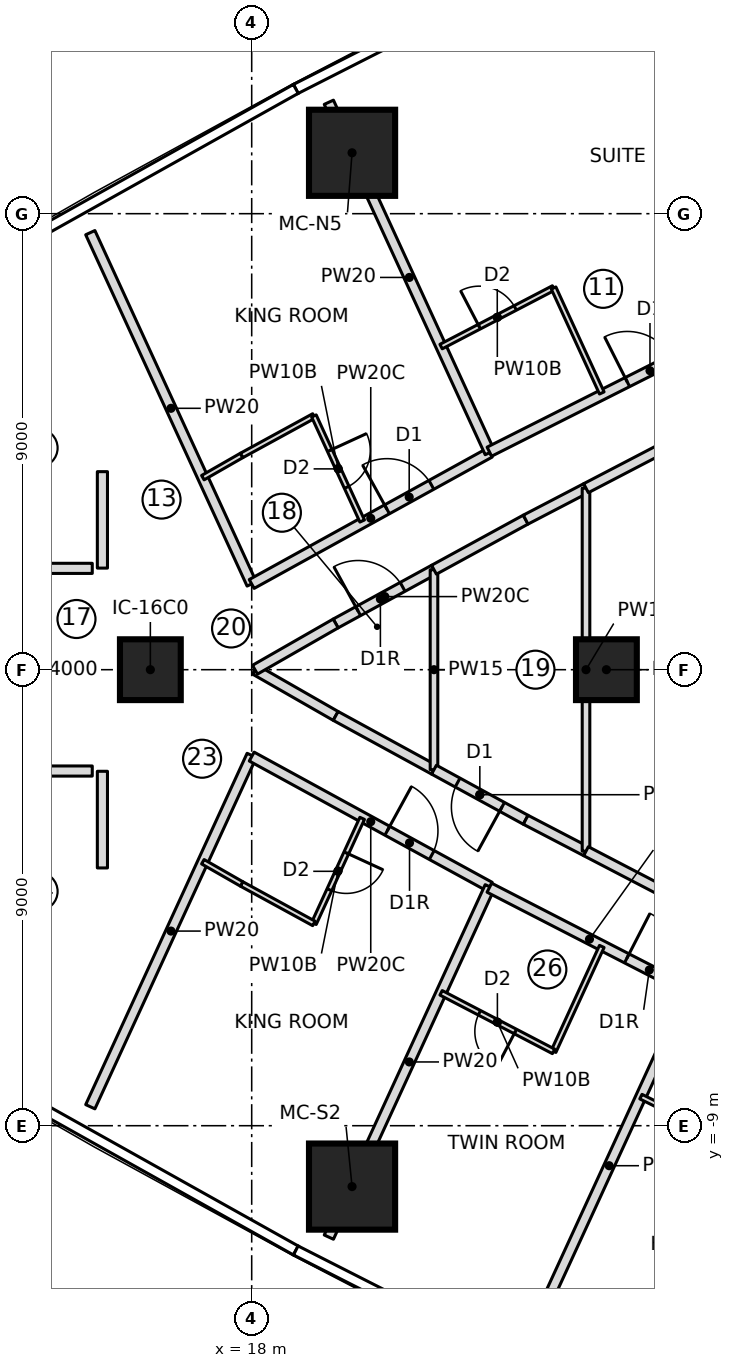
"""IFC4 building model, lengths in metres.
Left out: names, types, materials, properties, quantities, classifications, styles, units other than length and angle.
Written with IfcOpenShell. Run it as: python <this file> out.ifc"""

import sys

from ifc_helpers import new_model, si_unit, direction, frame, frame_2d, origin, origin_2d, place, context, subcontext, project, spatial, rectangle, extrude, element, fill, save


model = new_model("IFC4")
c1 = context("Model", 3, precision=1e-05, world=origin(), true_north=direction((0.0, 1.0)))
c2 = subcontext(c1, "Body", "Model", "MODEL_VIEW")
j1 = project(units=[si_unit("LENGTHUNIT", "METRE"), si_unit("PLANEANGLEUNIT", "RADIAN")], contexts=[c1])
p1 = place(None, origin())
s1 = spatial("IfcSite", under=j1, at=p1, CompositionType="ELEMENT")
p2 = place(p1, origin())
s2 = spatial("IfcBuilding", under=s1, at=p2, CompositionType="ELEMENT")
p3 = place(p2, frame((0.0, 0.0, 95.55)))
s3 = spatial("IfcBuildingStorey", under=s2, at=p3, CompositionType="ELEMENT", Elevation=95.55)
for number, where, z_axis, x_axis in (
    (1, (19.981, -10.202, 0.0), (0.0, 0.0, 1.0), (1.0, 0.0, 0.0)),
    (2, (19.981, 10.202, 0.0), (0.0, 0.0, 1.0), (1.0, 0.0, 0.0)),
):
    element("IfcColumn", number, at=place(p3, frame(where, z_axis=z_axis, x_axis=x_axis)), inside=s3, PredefinedType="COLUMN", context=c2, shape_type="SweptSolid", body=[
        extrude(rectangle(XDim=1.7, YDim=1.7, at=origin_2d()), origin(), (0.0, 0.0, 1.0), 3.55),
    ])
for number, where, z_axis, x_axis in (
    (3, (16.0, 0.0, 0.0), (0.0, 0.0, 1.0), (1.0, 0.0, 0.0)),
    (4, (25.0, 0.0, 0.0), (0.0, 0.0, 1.0), (1.0, 0.0, 0.0)),
):
    element("IfcColumn", number, at=place(p3, frame(where, z_axis=z_axis, x_axis=x_axis)), inside=s3, PredefinedType="COLUMN", context=c2, shape_type="SweptSolid", body=[
        extrude(rectangle(XDim=1.2, YDim=1.2, at=origin_2d()), origin(), (0.0, 0.0, 1.0), 3.55),
    ])
p4 = place(p3, frame((11.685, 2.0, 0.0), z_axis=(0.0, 0.0, 1.0), x_axis=(1.0, 0.0, 0.0)))
e5 = element("IfcWall", 5, at=p4, inside=s3, PredefinedType="PARTITIONING", context=c2, shape_type="SweptSolid", body=[
    extrude(rectangle(XDim=3.168, YDim=0.2, at=frame_2d((1.584, 0.0))), origin(), (0.0, 0.0, 1.0), 3.25),
])
p5 = place(p4, frame((1.084, 0.0, 0.0)))
e6 = element("IfcOpeningElement", 6, at=p5, cuts=e5, PredefinedType="OPENING", context=c2, shape_type="SweptSolid", body=[
    extrude(rectangle(XDim=1.0, YDim=2.1, at=frame_2d((0.5, 1.05))), frame((0.0, 0.11, 0.0), z_axis=(0.0, -1.0, 0.0), x_axis=(1.0, 0.0, 0.0)), (0.0, 0.0, 1.0), 0.22),
])
p6 = place(p3, frame((11.685, -2.0, 0.0), z_axis=(0.0, 0.0, 1.0), x_axis=(1.0, 0.0, 0.0)))
e7 = element("IfcWall", 7, at=p6, inside=s3, PredefinedType="PARTITIONING", context=c2, shape_type="SweptSolid", body=[
    extrude(rectangle(XDim=3.168, YDim=0.2, at=frame_2d((1.584, 0.0))), origin(), (0.0, 0.0, 1.0), 3.25),
])
p7 = place(p6, frame((1.084, 0.0, 0.0)))
e8 = element("IfcOpeningElement", 8, at=p7, cuts=e7, PredefinedType="OPENING", context=c2, shape_type="SweptSolid", body=[
    extrude(rectangle(XDim=1.0, YDim=2.1, at=frame_2d((0.5, 1.05))), frame((0.0, 0.11, 0.0), z_axis=(0.0, -1.0, 0.0), x_axis=(1.0, 0.0, 0.0)), (0.0, 0.0, 1.0), 0.22),
])
p8 = place(p3, frame((14.815, 8.626, 0.0), z_axis=(0.0, 0.0, 1.0), x_axis=(0.417432341259, -0.908708006166, 0.0)))
e9 = element("IfcWall", 9, at=p8, inside=s3, PredefinedType="PARTITIONING", context=c2, shape_type="SweptSolid", body=[
    extrude(rectangle(XDim=7.631, YDim=0.2, at=frame_2d((3.815, 0.0))), origin(), (0.0, 0.0, 1.0), 3.25),
])
p9 = place(p3, frame((18.0, 1.692, 0.0), z_axis=(0.0, 0.0, 1.0), x_axis=(0.875548487611, 0.483130257634, 0.0)))
e10 = element("IfcWall", 10, at=p9, inside=s3, PredefinedType="PARTITIONING", context=c2, shape_type="SweptSolid", body=[
    extrude(rectangle(XDim=5.367, YDim=0.2, at=frame_2d((2.683, 0.0))), origin(), (0.0, 0.0, 1.0), 3.25),
])
p10 = place(p9, frame((3.05, 0.0, 0.0)))
e11 = element("IfcOpeningElement", 11, at=p10, cuts=e10, PredefinedType="OPENING", context=c2, shape_type="SweptSolid", body=[
    extrude(rectangle(XDim=1.0, YDim=2.1, at=frame_2d((0.5, 1.05))), frame((0.0, 0.11, 0.0), z_axis=(0.0, -1.0, 0.0), x_axis=(1.0, 0.0, 0.0)), (0.0, 0.0, 1.0), 0.22),
])
p11 = place(p3, frame((17.036, 3.79, 0.0), z_axis=(0.0, 0.0, 1.0), x_axis=(0.867629162742, 0.497211862248, 0.0)))
e12 = element("IfcWall", 12, at=p11, inside=s3, PredefinedType="PARTITIONING", context=c2, shape_type="SweptSolid", body=[
    extrude(rectangle(XDim=0.882, YDim=0.1, at=frame_2d((0.441, 0.0))), origin(), (0.0, 0.0, 1.0), 3.25),
])
p12 = place(p3, frame((17.801, 4.229, 0.0), z_axis=(0.0, 0.0, 1.0), x_axis=(0.877424481957, 0.479714788663, 0.0)))
e13 = element("IfcWall", 13, at=p12, inside=s3, PredefinedType="PARTITIONING", context=c2, shape_type="SweptSolid", body=[
    extrude(rectangle(XDim=1.625, YDim=0.1, at=frame_2d((0.813, 0.0))), origin(), (0.0, 0.0, 1.0), 3.25),
])
p13 = place(p3, frame((19.228, 5.008, 0.0), z_axis=(0.0, 0.0, 1.0), x_axis=(0.417450047292, -0.908699872354, 0.0)))
e14 = element("IfcWall", 14, at=p13, inside=s3, PredefinedType="PARTITIONING", context=c2, shape_type="SweptSolid", body=[
    extrude(rectangle(XDim=2.283, YDim=0.1, at=frame_2d((1.141, 0.0))), origin(), (0.0, 0.0, 1.0), 3.25),
])
p14 = place(p13, frame((0.75, 0.0, 0.0)))
e15 = element("IfcOpeningElement", 15, at=p14, cuts=e14, PredefinedType="OPENING", context=c2, shape_type="SweptSolid", body=[
    extrude(rectangle(XDim=0.8, YDim=2.1, at=frame_2d((0.4, 1.05))), frame((0.0, 0.06, 0.0), z_axis=(0.0, -1.0, 0.0), x_axis=(1.0, 0.0, 0.0)), (0.0, 0.0, 1.0), 0.12),
])
p15 = place(p3, frame((22.699, 4.284, 0.0), z_axis=(0.0, 0.0, 1.0), x_axis=(-0.417413534969, 0.908716644959, 0.0)))
e16 = element("IfcWall", 16, at=p15, inside=s3, PredefinedType="PARTITIONING", context=c2, shape_type="SweptSolid", body=[
    extrude(rectangle(XDim=7.609, YDim=0.2, at=frame_2d((3.805, 0.0))), origin(), (0.0, 0.0, 1.0), 3.25),
])
p16 = place(p3, frame((22.69, 4.302, 0.0), z_axis=(0.0, 0.0, 1.0), x_axis=(0.892904919467, 0.450245271815, 0.0)))
e17 = element("IfcWall", 17, at=p16, inside=s3, PredefinedType="PARTITIONING", context=c2, shape_type="SweptSolid", body=[
    extrude(rectangle(XDim=8.883, YDim=0.2, at=frame_2d((4.441, 0.0))), origin(), (0.0, 0.0, 1.0), 3.25),
])
p17 = place(p16, frame((3.05, 0.0, 0.0)))
e18 = element("IfcOpeningElement", 18, at=p17, cuts=e17, PredefinedType="OPENING", context=c2, shape_type="SweptSolid", body=[
    extrude(rectangle(XDim=1.0, YDim=2.1, at=frame_2d((0.5, 1.05))), frame((0.0, 0.11, 0.0), z_axis=(0.0, -1.0, 0.0), x_axis=(1.0, 0.0, 0.0)), (0.0, 0.0, 1.0), 0.22),
])
p18 = place(p3, frame((21.738, 6.377, 0.0), z_axis=(0.0, 0.0, 1.0), x_axis=(0.886911586599, 0.461939214135, 0.0)))
e19 = element("IfcWall", 19, at=p18, inside=s3, PredefinedType="PARTITIONING", context=c2, shape_type="SweptSolid", body=[
    extrude(rectangle(XDim=2.503, YDim=0.1, at=frame_2d((1.251, 0.0))), origin(), (0.0, 0.0, 1.0), 3.25),
])
p19 = place(p18, frame((0.85, 0.0, 0.0)))
e20 = element("IfcOpeningElement", 20, at=p19, cuts=e19, PredefinedType="OPENING", context=c2, shape_type="SweptSolid", body=[
    extrude(rectangle(XDim=0.8, YDim=2.1, at=frame_2d((0.4, 1.05))), frame((0.0, 0.06, 0.0), z_axis=(0.0, -1.0, 0.0), x_axis=(1.0, 0.0, 0.0)), (0.0, 0.0, 1.0), 0.12),
])
p20 = place(p3, frame((23.958, 7.533, 0.0), z_axis=(0.0, 0.0, 1.0), x_axis=(0.417454762401, -0.908697706253, 0.0)))
e21 = element("IfcWall", 21, at=p20, inside=s3, PredefinedType="PARTITIONING", context=c2, shape_type="SweptSolid", body=[
    extrude(rectangle(XDim=2.28, YDim=0.1, at=frame_2d((1.14, 0.0))), origin(), (0.0, 0.0, 1.0), 3.25),
])
p21 = place(p3, frame((14.815, -8.626, 0.0), z_axis=(0.0, 0.0, 1.0), x_axis=(0.417432341259, 0.908708006166, 0.0)))
e22 = element("IfcWall", 22, at=p21, inside=s3, PredefinedType="PARTITIONING", context=c2, shape_type="SweptSolid", body=[
    extrude(rectangle(XDim=7.631, YDim=0.2, at=frame_2d((3.815, 0.0))), origin(), (0.0, 0.0, 1.0), 3.25),
])
p22 = place(p3, frame((18.0, -1.715, 0.0), z_axis=(0.0, 0.0, 1.0), x_axis=(0.877354946945, -0.479841950096, 0.0)))
e23 = element("IfcWall", 23, at=p22, inside=s3, PredefinedType="PARTITIONING", context=c2, shape_type="SweptSolid", body=[
    extrude(rectangle(XDim=5.355, YDim=0.2, at=frame_2d((2.678, 0.0))), origin(), (0.0, 0.0, 1.0), 3.25),
])
p23 = place(p22, frame((3.05, 0.0, 0.0)))
e24 = element("IfcOpeningElement", 24, at=p23, cuts=e23, PredefinedType="OPENING", context=c2, shape_type="SweptSolid", body=[
    extrude(rectangle(XDim=1.0, YDim=2.1, at=frame_2d((0.5, 1.05))), frame((0.0, 0.11, 0.0), z_axis=(0.0, -1.0, 0.0), x_axis=(1.0, 0.0, 0.0)), (0.0, 0.0, 1.0), 0.22),
])
p24 = place(p3, frame((20.18, -2.934, 0.0), z_axis=(0.0, 0.0, 1.0), x_axis=(-0.417450047292, -0.908699872354, 0.0)))
e25 = element("IfcWall", 25, at=p24, inside=s3, PredefinedType="PARTITIONING", context=c2, shape_type="SweptSolid", body=[
    extrude(rectangle(XDim=2.283, YDim=0.1, at=frame_2d((1.141, 0.0))), origin(), (0.0, 0.0, 1.0), 3.25),
])
p25 = place(p24, frame((0.75, 0.0, 0.0)))
e26 = element("IfcOpeningElement", 26, at=p25, cuts=e25, PredefinedType="OPENING", context=c2, shape_type="SweptSolid", body=[
    extrude(rectangle(XDim=0.8, YDim=2.1, at=frame_2d((0.4, 1.05))), frame((0.0, 0.06, 0.0), z_axis=(0.0, -1.0, 0.0), x_axis=(1.0, 0.0, 0.0)), (0.0, 0.0, 1.0), 0.12),
])
p26 = place(p3, frame((19.228, -5.008, 0.0), z_axis=(0.0, 0.0, 1.0), x_axis=(-0.877424481957, 0.479714788663, 0.0)))
e27 = element("IfcWall", 27, at=p26, inside=s3, PredefinedType="PARTITIONING", context=c2, shape_type="SweptSolid", body=[
    extrude(rectangle(XDim=1.625, YDim=0.1, at=frame_2d((0.813, 0.0))), origin(), (0.0, 0.0, 1.0), 3.25),
])
p27 = place(p3, frame((17.801, -4.229, 0.0), z_axis=(0.0, 0.0, 1.0), x_axis=(-0.867629162742, 0.497211862248, 0.0)))
e28 = element("IfcWall", 28, at=p27, inside=s3, PredefinedType="PARTITIONING", context=c2, shape_type="SweptSolid", body=[
    extrude(rectangle(XDim=0.882, YDim=0.1, at=frame_2d((0.441, 0.0))), origin(), (0.0, 0.0, 1.0), 3.25),
])
p28 = place(p3, frame((19.522, -11.199, 0.0), z_axis=(0.0, 0.0, 1.0), x_axis=(0.417413534969, 0.908716644959, 0.0)))
e29 = element("IfcWall", 29, at=p28, inside=s3, PredefinedType="PARTITIONING", context=c2, shape_type="SweptSolid", body=[
    extrude(rectangle(XDim=7.609, YDim=0.2, at=frame_2d((3.805, 0.0))), origin(), (0.0, 0.0, 1.0), 3.25),
])
p29 = place(p3, frame((22.69, -4.302, 0.0), z_axis=(0.0, 0.0, 1.0), x_axis=(0.889236075961, -0.457448577667, 0.0)))
e30 = element("IfcWall", 30, at=p29, inside=s3, PredefinedType="PARTITIONING", context=c2, shape_type="SweptSolid", body=[
    extrude(rectangle(XDim=4.443, YDim=0.2, at=frame_2d((2.222, 0.0))), origin(), (0.0, 0.0, 1.0), 3.25),
])
p30 = place(p29, frame((3.05, 0.0, 0.0)))
e31 = element("IfcOpeningElement", 31, at=p30, cuts=e30, PredefinedType="OPENING", context=c2, shape_type="SweptSolid", body=[
    extrude(rectangle(XDim=1.0, YDim=2.1, at=frame_2d((0.5, 1.05))), frame((0.0, 0.11, 0.0), z_axis=(0.0, -1.0, 0.0), x_axis=(1.0, 0.0, 0.0)), (0.0, 0.0, 1.0), 0.22),
])
p31 = place(p3, frame((24.909, -5.462, 0.0), z_axis=(0.0, 0.0, 1.0), x_axis=(-0.417454762401, -0.908697706253, 0.0)))
e32 = element("IfcWall", 32, at=p31, inside=s3, PredefinedType="PARTITIONING", context=c2, shape_type="SweptSolid", body=[
    extrude(rectangle(XDim=2.28, YDim=0.1, at=frame_2d((1.14, 0.0))), origin(), (0.0, 0.0, 1.0), 3.25),
])
p32 = place(p3, frame((23.958, -7.533, 0.0), z_axis=(0.0, 0.0, 1.0), x_axis=(-0.886911586599, 0.461939214135, 0.0)))
e33 = element("IfcWall", 33, at=p32, inside=s3, PredefinedType="PARTITIONING", context=c2, shape_type="SweptSolid", body=[
    extrude(rectangle(XDim=2.503, YDim=0.1, at=frame_2d((1.251, 0.0))), origin(), (0.0, 0.0, 1.0), 3.25),
])
p33 = place(p32, frame((0.85, 0.0, 0.0)))
e34 = element("IfcOpeningElement", 34, at=p33, cuts=e33, PredefinedType="OPENING", context=c2, shape_type="SweptSolid", body=[
    extrude(rectangle(XDim=0.8, YDim=2.1, at=frame_2d((0.4, 1.05))), frame((0.0, 0.06, 0.0), z_axis=(0.0, -1.0, 0.0), x_axis=(1.0, 0.0, 0.0)), (0.0, 0.0, 1.0), 0.12),
])
p34 = place(p3, frame((23.467, -13.244, 0.0), z_axis=(0.0, 0.0, 1.0), x_axis=(0.417455028008, 0.908697584233, 0.0)))
e35 = element("IfcWall", 35, at=p34, inside=s3, PredefinedType="PARTITIONING", context=c2, shape_type="SweptSolid", body=[
    extrude(rectangle(XDim=7.603, YDim=0.2, at=frame_2d((3.802, 0.0))), origin(), (0.0, 0.0, 1.0), 3.25),
])
p35 = place(p3, frame((27.922, -9.537, 0.0), z_axis=(0.0, 0.0, 1.0), x_axis=(-0.895944857815, 0.444165297784, 0.0)))
e36 = element("IfcWall", 36, at=p35, inside=s3, PredefinedType="PARTITIONING", context=c2, shape_type="SweptSolid", body=[
    extrude(rectangle(XDim=2.501, YDim=0.1, at=frame_2d((1.25, 0.0))), origin(), (0.0, 0.0, 1.0), 3.25),
])
p36 = place(p35, frame((0.85, 0.0, 0.0)))
e37 = element("IfcOpeningElement", 37, at=p36, cuts=e36, PredefinedType="OPENING", context=c2, shape_type="SweptSolid", body=[
    extrude(rectangle(XDim=0.8, YDim=2.1, at=frame_2d((0.4, 1.05))), frame((0.0, 0.06, 0.0), z_axis=(0.0, -1.0, 0.0), x_axis=(1.0, 0.0, 0.0)), (0.0, 0.0, 1.0), 0.12),
])
p37 = place(p3, frame((19.657, 0.912, 0.0), z_axis=(0.0, 0.0, 1.0), x_axis=(0.877490210137, 0.479594548671, 0.0)))
e38 = element("IfcWall", 38, at=p37, inside=s3, PredefinedType="PARTITIONING", context=c2, shape_type="SweptSolid", body=[
    extrude(rectangle(XDim=2.211, YDim=0.2, at=frame_2d((1.106, 0.0))), origin(), (0.0, 0.0, 1.0), 3.25),
])
p38 = place(p37, frame((0.506, 0.0, 0.0)))
e39 = element("IfcOpeningElement", 39, at=p38, cuts=e38, PredefinedType="OPENING", context=c2, shape_type="SweptSolid", body=[
    extrude(rectangle(XDim=1.0, YDim=2.1, at=frame_2d((0.5, 1.05))), frame((0.0, 0.11, 0.0), z_axis=(0.0, -1.0, 0.0), x_axis=(1.0, 0.0, 0.0)), (0.0, 0.0, 1.0), 0.22),
])
for number, where, z_axis, x_axis in (
    (40, (19.657, -0.912, 0.0), (0.0, 0.0, 1.0), (-0.868, 0.497, 0.0)),
    (41, (18.065, 0.0, 0.0), (0.0, 0.0, 1.0), (0.868, 0.497, 0.0)),
):
    element("IfcWall", number, at=place(p3, frame(where, z_axis=z_axis, x_axis=x_axis)), inside=s3, PredefinedType="PARTITIONING", context=c2, shape_type="SweptSolid", body=[
        extrude(rectangle(XDim=1.835, YDim=0.2, at=frame_2d((0.918, 0.0))), origin(), (0.0, 0.0, 1.0), 3.25),
    ])
p39 = place(p3, frame((21.598, -1.973, 0.0), z_axis=(0.0, 0.0, 1.0), x_axis=(-0.877490210137, 0.479594548671, 0.0)))
e42 = element("IfcWall", 42, at=p39, inside=s3, PredefinedType="PARTITIONING", context=c2, shape_type="SweptSolid", body=[
    extrude(rectangle(XDim=2.211, YDim=0.2, at=frame_2d((1.106, 0.0))), origin(), (0.0, 0.0, 1.0), 3.25),
])
p40 = place(p3, frame((21.598, -1.973, 0.0), z_axis=(0.0, 0.0, 1.0), x_axis=(0.0, 1.0, 0.0)))
e43 = element("IfcWall", 43, at=p40, inside=s3, PredefinedType="PARTITIONING", context=c2, shape_type="SweptSolid", body=[
    extrude(rectangle(XDim=3.946, YDim=0.15, at=frame_2d((1.973, 0.0))), origin(), (0.0, 0.0, 1.0), 3.25),
])
p41 = place(p3, frame((23.407, -2.962, 0.0), z_axis=(0.0, 0.0, 1.0), x_axis=(-0.877438115071, 0.479689852113, 0.0)))
e44 = element("IfcWall", 44, at=p41, inside=s3, PredefinedType="PARTITIONING", context=c2, shape_type="SweptSolid", body=[
    extrude(rectangle(XDim=2.062, YDim=0.2, at=frame_2d((1.031, 0.0))), origin(), (0.0, 0.0, 1.0), 3.25),
])
p42 = place(p41, frame((0.531, 0.0, 0.0)))
e45 = element("IfcOpeningElement", 45, at=p42, cuts=e44, PredefinedType="OPENING", context=c2, shape_type="SweptSolid", body=[
    extrude(rectangle(XDim=1.0, YDim=2.1, at=frame_2d((0.5, 1.05))), frame((0.0, 0.11, 0.0), z_axis=(0.0, -1.0, 0.0), x_axis=(1.0, 0.0, 0.0)), (0.0, 0.0, 1.0), 0.22),
])
p43 = place(p3, frame((21.598, 1.973, 0.0), z_axis=(0.0, 0.0, 1.0), x_axis=(0.877438115071, 0.479689852113, 0.0)))
e46 = element("IfcWall", 46, at=p43, inside=s3, PredefinedType="PARTITIONING", context=c2, shape_type="SweptSolid", body=[
    extrude(rectangle(XDim=2.062, YDim=0.2, at=frame_2d((1.031, 0.0))), origin(), (0.0, 0.0, 1.0), 3.25),
])
for number, where, z_axis, x_axis in (
    (47, (23.407, 2.962, 0.0), (0.0, 0.0, 1.0), (0.887, 0.462, 0.0)),
    (48, (24.598, -3.582, 0.0), (0.0, 0.0, 1.0), (-0.887, 0.462, 0.0)),
):
    element("IfcWall", number, at=place(p3, frame(where, z_axis=z_axis, x_axis=x_axis)), inside=s3, PredefinedType="PARTITIONING", context=c2, shape_type="SweptSolid", body=[
        extrude(rectangle(XDim=1.343, YDim=0.2, at=frame_2d((0.671, 0.0))), origin(), (0.0, 0.0, 1.0), 3.25),
    ])
p44 = place(p3, frame((24.598, -3.582, 0.0), z_axis=(0.0, 0.0, 1.0), x_axis=(0.0, 1.0, 0.0)))
e49 = element("IfcWall", 49, at=p44, inside=s3, PredefinedType="PARTITIONING", context=c2, shape_type="SweptSolid", body=[
    extrude(rectangle(XDim=7.165, YDim=0.15, at=frame_2d((3.582, 0.0))), origin(), (0.0, 0.0, 1.0), 3.25),
])
for number, where, z_axis, x_axis in (
    (50, (27.196, -4.936, 0.0), (0.0, 0.0, 1.0), (-0.887, 0.462, 0.0)),
    (51, (24.598, 3.582, 0.0), (0.0, 0.0, 1.0), (0.887, 0.462, 0.0)),
):
    element("IfcWall", number, at=place(p3, frame(where, z_axis=z_axis, x_axis=x_axis)), inside=s3, PredefinedType="PARTITIONING", context=c2, shape_type="SweptSolid", body=[
        extrude(rectangle(XDim=2.93, YDim=0.2, at=frame_2d((1.465, 0.0))), origin(), (0.0, 0.0, 1.0), 3.25),
    ])
p45 = place(p3, frame((15.054, 3.909, 0.0), z_axis=(0.0, 0.0, 1.0), x_axis=(0.0, -1.0, 0.0)))
e52 = element("IfcWall", 52, at=p45, inside=s3, PredefinedType="PARTITIONING", context=c2, shape_type="SweptSolid", body=[
    extrude(rectangle(XDim=1.904, YDim=0.2, at=frame_2d((0.952, 0.0))), origin(), (0.0, 0.0, 1.0), 3.25),
])
p46 = place(p3, frame((15.054, -2.005, 0.0), z_axis=(0.0, 0.0, 1.0), x_axis=(0.0, -1.0, 0.0)))
e53 = element("IfcWall", 53, at=p46, inside=s3, PredefinedType="PARTITIONING", context=c2, shape_type="SweptSolid", body=[
    extrude(rectangle(XDim=1.908, YDim=0.2, at=frame_2d((0.954, 0.0))), origin(), (0.0, 0.0, 1.0), 3.25),
])
p47 = place(p14, origin())
e54 = element("IfcDoor", 54, at=p47, inside=s3, OperationType="SINGLE_SWING_LEFT", PredefinedType="DOOR", context=c2, shape_type="SweptSolid", body=[
    extrude(rectangle(XDim=0.8, YDim=2.1, at=frame_2d((0.4, 1.05))), frame((0.0, 0.025, 0.0), z_axis=(0.0, -1.0, 0.0), x_axis=(1.0, 0.0, 0.0)), (0.0, 0.0, 1.0), 0.05),
])
fill(e15, e54)
p48 = place(p10, origin())
e55 = element("IfcDoor", 55, at=p48, inside=s3, OperationType="SINGLE_SWING_LEFT", PredefinedType="DOOR", context=c2, shape_type="SweptSolid", body=[
    extrude(rectangle(XDim=1.0, YDim=2.1, at=frame_2d((0.5, 1.05))), frame((0.0, 0.025, 0.0), z_axis=(0.0, -1.0, 0.0), x_axis=(1.0, 0.0, 0.0)), (0.0, 0.0, 1.0), 0.05),
])
fill(e11, e55)
p49 = place(p19, origin())
e56 = element("IfcDoor", 56, at=p49, inside=s3, OperationType="SINGLE_SWING_LEFT", PredefinedType="DOOR", context=c2, shape_type="SweptSolid", body=[
    extrude(rectangle(XDim=0.8, YDim=2.1, at=frame_2d((0.4, 1.05))), frame((0.0, 0.025, 0.0), z_axis=(0.0, -1.0, 0.0), x_axis=(1.0, 0.0, 0.0)), (0.0, 0.0, 1.0), 0.05),
])
fill(e20, e56)
p50 = place(p17, origin())
e57 = element("IfcDoor", 57, at=p50, inside=s3, OperationType="SINGLE_SWING_LEFT", PredefinedType="DOOR", context=c2, shape_type="SweptSolid", body=[
    extrude(rectangle(XDim=1.0, YDim=2.1, at=frame_2d((0.5, 1.05))), frame((0.0, 0.025, 0.0), z_axis=(0.0, -1.0, 0.0), x_axis=(1.0, 0.0, 0.0)), (0.0, 0.0, 1.0), 0.05),
])
fill(e18, e57)
p51 = place(p25, origin())
e58 = element("IfcDoor", 58, at=p51, inside=s3, OperationType="SINGLE_SWING_LEFT", PredefinedType="DOOR", context=c2, shape_type="SweptSolid", body=[
    extrude(rectangle(XDim=0.8, YDim=2.1, at=frame_2d((0.4, 1.05))), frame((0.0, 0.025, 0.0), z_axis=(0.0, -1.0, 0.0), x_axis=(1.0, 0.0, 0.0)), (0.0, 0.0, 1.0), 0.05),
])
fill(e26, e58)
p52 = place(p23, origin())
e59 = element("IfcDoor", 59, at=p52, inside=s3, OperationType="SINGLE_SWING_RIGHT", PredefinedType="DOOR", context=c2, shape_type="SweptSolid", body=[
    extrude(rectangle(XDim=1.0, YDim=2.1, at=frame_2d((0.5, 1.05))), frame((0.0, 0.025, 0.0), z_axis=(0.0, -1.0, 0.0), x_axis=(1.0, 0.0, 0.0)), (0.0, 0.0, 1.0), 0.05),
])
fill(e24, e59)
p53 = place(p33, origin())
e60 = element("IfcDoor", 60, at=p53, inside=s3, OperationType="SINGLE_SWING_LEFT", PredefinedType="DOOR", context=c2, shape_type="SweptSolid", body=[
    extrude(rectangle(XDim=0.8, YDim=2.1, at=frame_2d((0.4, 1.05))), frame((0.0, 0.025, 0.0), z_axis=(0.0, -1.0, 0.0), x_axis=(1.0, 0.0, 0.0)), (0.0, 0.0, 1.0), 0.05),
])
fill(e34, e60)
p54 = place(p30, origin())
e61 = element("IfcDoor", 61, at=p54, inside=s3, OperationType="SINGLE_SWING_RIGHT", PredefinedType="DOOR", context=c2, shape_type="SweptSolid", body=[
    extrude(rectangle(XDim=1.0, YDim=2.1, at=frame_2d((0.5, 1.05))), frame((0.0, 0.025, 0.0), z_axis=(0.0, -1.0, 0.0), x_axis=(1.0, 0.0, 0.0)), (0.0, 0.0, 1.0), 0.05),
])
fill(e31, e61)
p55 = place(p38, origin())
e62 = element("IfcDoor", 62, at=p55, inside=s3, OperationType="SINGLE_SWING_RIGHT", PredefinedType="DOOR", context=c2, shape_type="SweptSolid", body=[
    extrude(rectangle(XDim=1.0, YDim=2.1, at=frame_2d((0.5, 1.05))), frame((0.0, 0.025, 0.0), z_axis=(0.0, -1.0, 0.0), x_axis=(1.0, 0.0, 0.0)), (0.0, 0.0, 1.0), 0.05),
])
fill(e39, e62)
p56 = place(p42, origin())
e63 = element("IfcDoor", 63, at=p56, inside=s3, OperationType="SINGLE_SWING_LEFT", PredefinedType="DOOR", context=c2, shape_type="SweptSolid", body=[
    extrude(rectangle(XDim=1.0, YDim=2.1, at=frame_2d((0.5, 1.05))), frame((0.0, 0.025, 0.0), z_axis=(0.0, -1.0, 0.0), x_axis=(1.0, 0.0, 0.0)), (0.0, 0.0, 1.0), 0.05),
])
fill(e45, e63)
save(model, sys.argv[1])
